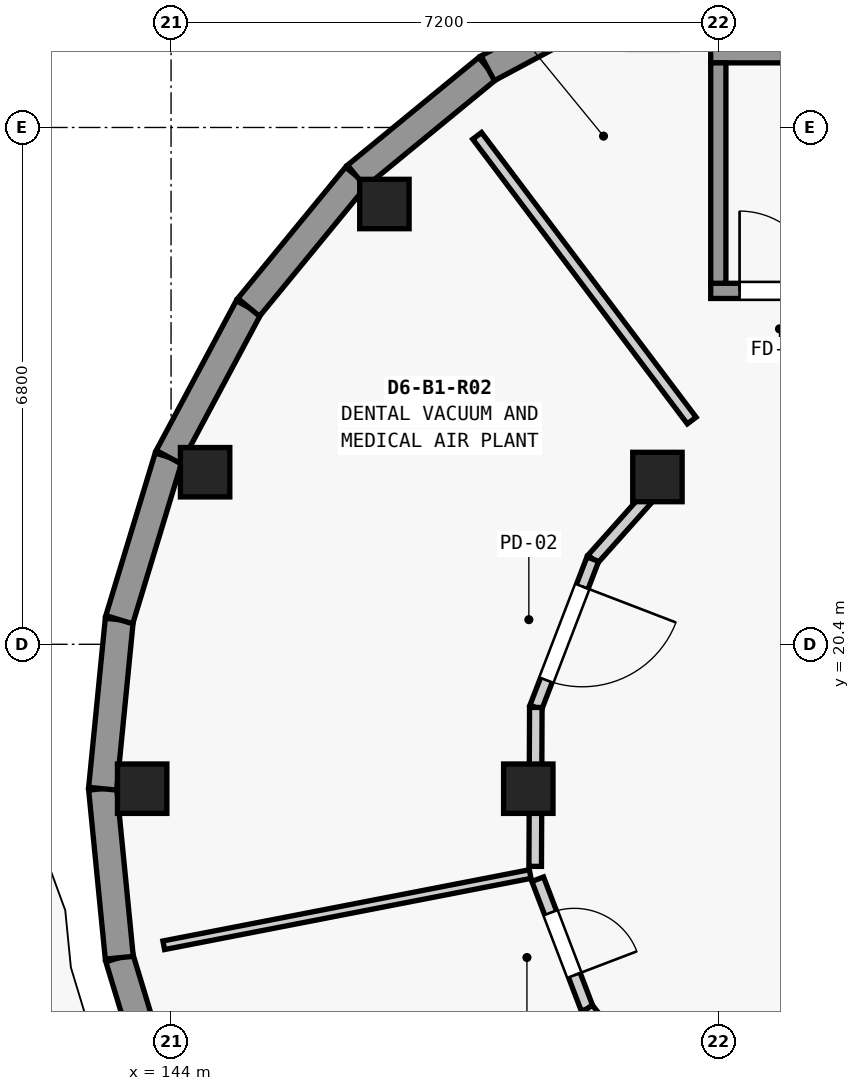
"""IFC4 building model, lengths in metres.
Left out: names, types, materials, properties, quantities, classifications, styles, units other than length and angle.
Written with IfcOpenShell. Run it as: python <this file> out.ifc"""

import sys

from ifc_helpers import new_model, si_unit, direction, frame, frame_2d, origin, origin_2d, place, context, subcontext, project, spatial, rectangle, extrude, element, fill, save


model = new_model("IFC4")
c1 = context("Model", 3, precision=1e-05, world=origin(), true_north=direction((0.0, 1.0)))
c2 = subcontext(c1, "Body", "Model", "MODEL_VIEW")
j1 = project(units=[si_unit("LENGTHUNIT", "METRE"), si_unit("PLANEANGLEUNIT", "RADIAN")], contexts=[c1])
p1 = place(None, origin())
s1 = spatial("IfcSite", under=j1, at=p1, CompositionType="ELEMENT")
p2 = place(p1, origin())
s2 = spatial("IfcBuilding", under=s1, at=p2, CompositionType="ELEMENT")
p3 = place(p2, frame((0.0, 0.0, -4.55)))
s3 = spatial("IfcBuildingStorey", under=s2, at=p3, CompositionType="ELEMENT", Elevation=-4.55)
for number, where, z_axis, x_axis in (
    (1, (146.807, 26.193, 0.0), (0.0, 0.0, 1.0), (1.0, 0.0, 0.0)),
    (2, (144.448, 22.664, 0.0), (0.0, 0.0, 1.0), (1.0, 0.0, 0.0)),
    (3, (143.62, 18.5, 0.0), (0.0, 0.0, 1.0), (1.0, 0.0, 0.0)),
    (4, (150.399, 22.601, 0.0), (0.0, 0.0, 1.0), (1.0, 0.0, 0.0)),
    (5, (148.7, 18.5, 0.0), (0.0, 0.0, 1.0), (1.0, 0.0, 0.0)),
):
    element("IfcColumn", number, at=place(p3, frame(where, z_axis=z_axis, x_axis=x_axis)), inside=s3, PredefinedType="COLUMN", context=c2, shape_type="SweptSolid", body=[
        extrude(rectangle(XDim=0.65, YDim=0.65, at=origin_2d()), origin(), (0.0, 0.0, 1.0), 4.55),
    ])
p4 = place(p3, frame((143.968, 14.137, 0.0), z_axis=(0.0, 0.0, 1.0), x_axis=(-0.290322655883, 0.956928814218, 0.0)))
e6 = element("IfcWall", 6, at=p4, inside=s3, PredefinedType="USERDEFINED", context=c2, shape_type="SweptSolid", body=[
    extrude(rectangle(XDim=2.235, YDim=0.37, at=frame_2d((1.118, 0.0))), origin(), (0.0, 0.0, 1.0), 3.348),
])
for number, where, z_axis, x_axis in (
    (7, (143.319, 16.276, 0.0), (0.0, 0.0, 1.0), (-0.098, 0.995, 0.0)),
    (8, (143.1, 18.5, 0.0), (0.0, 0.0, 1.0), (0.098, 0.995, 0.0)),
):
    element("IfcWall", number, at=place(p3, frame(where, z_axis=z_axis, x_axis=x_axis)), inside=s3, PredefinedType="USERDEFINED", context=c2, shape_type="SweptSolid", body=[
        extrude(rectangle(XDim=2.235, YDim=0.37, at=frame_2d((1.117, 0.0))), origin(), (0.0, 0.0, 1.0), 3.348),
    ])
p5 = place(p3, frame((143.319, 20.724, 0.0), z_axis=(0.0, 0.0, 1.0), x_axis=(0.290322655883, 0.956928814218, 0.0)))
e9 = element("IfcWall", 9, at=p5, inside=s3, PredefinedType="USERDEFINED", context=c2, shape_type="SweptSolid", body=[
    extrude(rectangle(XDim=2.235, YDim=0.37, at=frame_2d((1.118, 0.0))), origin(), (0.0, 0.0, 1.0), 3.348),
])
for number, where, z_axis, x_axis in (
    (10, (143.968, 22.863, 0.0), (0.0, 0.0, 1.0), (0.471, 0.882, 0.0)),
    (11, (145.021, 24.834, 0.0), (0.0, 0.0, 1.0), (0.635, 0.773, 0.0)),
    (12, (146.439, 26.561, 0.0), (0.0, 0.0, 1.0), (0.773, 0.635, 0.0)),
    (13, (148.166, 27.979, 0.0), (0.0, 0.0, 1.0), (0.882, 0.471, 0.0)),
):
    element("IfcWall", number, at=place(p3, frame(where, z_axis=z_axis, x_axis=x_axis)), inside=s3, PredefinedType="USERDEFINED", context=c2, shape_type="SweptSolid", body=[
        extrude(rectangle(XDim=2.235, YDim=0.37, at=frame_2d((1.117, 0.0))), origin(), (0.0, 0.0, 1.0), 3.348),
    ])
p6 = place(p3, frame((151.1, 25.05, 0.0), z_axis=(0.0, 0.0, 1.0), x_axis=(1.0, 0.0, 0.0)))
e14 = element("IfcWall", 14, at=p6, inside=s3, PredefinedType="SHEAR", context=c2, shape_type="SweptSolid", body=[
    extrude(rectangle(XDim=6.8, YDim=0.2, at=frame_2d((3.4, 0.0))), origin(), (0.0, 0.0, 1.0), 4.148),
])
p7 = place(p6, frame((0.38, 0.0, 0.0)))
e15 = element("IfcOpeningElement", 15, at=p7, cuts=e14, PredefinedType="OPENING", context=c2, shape_type="SweptSolid", body=[
    extrude(rectangle(XDim=1.05, YDim=2.15, at=frame_2d((0.525, 1.075))), frame((0.0, 0.11, 0.0), z_axis=(0.0, -1.0, 0.0), x_axis=(1.0, 0.0, 0.0)), (0.0, 0.0, 1.0), 0.22),
])
p8 = place(p3, frame((151.1, 28.15, 0.0), z_axis=(0.0, 0.0, 1.0), x_axis=(1.0, 0.0, 0.0)))
e16 = element("IfcWall", 16, at=p8, inside=s3, PredefinedType="SHEAR", context=c2, shape_type="SweptSolid", body=[
    extrude(rectangle(XDim=6.8, YDim=0.2, at=frame_2d((3.4, 0.0))), origin(), (0.0, 0.0, 1.0), 4.148),
])
p9 = place(p3, frame((151.2, 25.15, 0.0), z_axis=(0.0, 0.0, 1.0), x_axis=(0.0, 1.0, 0.0)))
e17 = element("IfcWall", 17, at=p9, inside=s3, PredefinedType="SHEAR", context=c2, shape_type="SweptSolid", body=[
    extrude(rectangle(XDim=2.9, YDim=0.2, at=frame_2d((1.45, 0.0))), origin(), (0.0, 0.0, 1.0), 4.148),
])
p10 = place(p3, frame((150.85, 23.344, 0.0), z_axis=(0.0, 0.0, 1.0), x_axis=(-0.601830514666, 0.798623836118, 0.0)))
e18 = element("IfcWall", 18, at=p10, inside=s3, PredefinedType="PARTITIONING", context=c2, shape_type="SweptSolid", body=[
    extrude(rectangle(XDim=4.691, YDim=0.145, at=frame_2d((2.345, 0.0))), origin(), (0.0, 0.0, 1.0), 3.323),
])
p11 = place(p3, frame((148.725, 17.377, 0.0), z_axis=(0.0, 0.0, 1.0), x_axis=(-0.981631167978, -0.190788495604, 0.0)))
e19 = element("IfcWall", 19, at=p11, inside=s3, PredefinedType="PARTITIONING", context=c2, shape_type="SweptSolid", body=[
    extrude(rectangle(XDim=4.911, YDim=0.115, at=frame_2d((2.456, 0.0))), origin(), (0.0, 0.0, 1.0), 3.323),
])
p12 = place(p3, frame((150.251, 22.307, 0.0), z_axis=(0.0, 0.0, 1.0), x_axis=(-0.665670610056, -0.746245696073, 0.0)))
e20 = element("IfcWall", 20, at=p12, inside=s3, PredefinedType="PARTITIONING", context=c2, shape_type="SweptSolid", body=[
    extrude(rectangle(XDim=1.054, YDim=0.165, at=frame_2d((0.527, 0.0))), origin(), (0.0, 0.0, 1.0), 3.323),
])
p13 = place(p3, frame((149.549, 21.52, 0.0), z_axis=(0.0, 0.0, 1.0), x_axis=(-0.358830356871, -0.93340279354, 0.0)))
e21 = element("IfcWall", 21, at=p13, inside=s3, PredefinedType="PARTITIONING", context=c2, shape_type="SweptSolid", body=[
    extrude(rectangle(XDim=2.09, YDim=0.165, at=frame_2d((1.045, 0.0))), origin(), (0.0, 0.0, 1.0), 3.323),
])
p14 = place(p13, frame((0.385, 0.0, 0.0)))
e22 = element("IfcOpeningElement", 22, at=p14, cuts=e21, PredefinedType="OPENING", context=c2, shape_type="SweptSolid", body=[
    extrude(rectangle(XDim=1.32, YDim=2.24, at=frame_2d((0.66, 1.12))), frame((0.0, 0.093, 0.0), z_axis=(0.0, -1.0, 0.0), x_axis=(1.0, 0.0, 0.0)), (0.0, 0.0, 1.0), 0.185),
])
p15 = place(p3, frame((148.799, 19.569, 0.0), z_axis=(0.0, 0.0, 1.0), x_axis=(-0.004213900998, -0.99999112148, 0.0)))
e23 = element("IfcWall", 23, at=p15, inside=s3, PredefinedType="PARTITIONING", context=c2, shape_type="SweptSolid", body=[
    extrude(rectangle(XDim=0.753, YDim=0.165, at=frame_2d((0.376, 0.0))), origin(), (0.0, 0.0, 1.0), 3.323),
])
p16 = place(p3, frame((148.794, 18.184, 0.0), z_axis=(0.0, 0.0, 1.0), x_axis=(-0.004149341873, -0.999991391444, 0.0)))
e24 = element("IfcWall", 24, at=p16, inside=s3, PredefinedType="PARTITIONING", context=c2, shape_type="SweptSolid", body=[
    extrude(rectangle(XDim=0.706, YDim=0.165, at=frame_2d((0.353, 0.0))), origin(), (0.0, 0.0, 1.0), 3.323),
])
p17 = place(p3, frame((148.824, 17.309, 0.0), z_axis=(0.0, 0.0, 1.0), x_axis=(0.356746140056, -0.934201365636, 0.0)))
e25 = element("IfcWall", 25, at=p17, inside=s3, PredefinedType="PARTITIONING", context=c2, shape_type="SweptSolid", body=[
    extrude(rectangle(XDim=1.825, YDim=0.165, at=frame_2d((0.913, 0.0))), origin(), (0.0, 0.0, 1.0), 3.323),
])
p18 = place(p17, frame((0.472, 0.0, 0.0)))
e26 = element("IfcOpeningElement", 26, at=p18, cuts=e25, PredefinedType="OPENING", context=c2, shape_type="SweptSolid", body=[
    extrude(rectangle(XDim=0.88, YDim=2.1, at=frame_2d((0.44, 1.05))), frame((0.0, 0.093, 0.0), z_axis=(0.0, -1.0, 0.0), x_axis=(1.0, 0.0, 0.0)), (0.0, 0.0, 1.0), 0.185),
])
p19 = place(p3, frame((149.475, 15.604, 0.0), z_axis=(0.0, 0.0, 1.0), x_axis=(0.62928673226, -0.777173216601, 0.0)))
e27 = element("IfcWall", 27, at=p19, inside=s3, PredefinedType="PARTITIONING", context=c2, shape_type="SweptSolid", body=[
    extrude(rectangle(XDim=1.19, YDim=0.165, at=frame_2d((0.595, 0.0))), origin(), (0.0, 0.0, 1.0), 3.323),
])
p20 = place(p7, origin())
e28 = element("IfcDoor", 28, at=p20, inside=s3, OperationType="SINGLE_SWING_LEFT", PredefinedType="DOOR", context=c2, shape_type="SweptSolid", body=[
    extrude(rectangle(XDim=1.05, YDim=2.15, at=frame_2d((0.525, 1.075))), frame((0.0, 0.025, 0.0), z_axis=(0.0, -1.0, 0.0), x_axis=(1.0, 0.0, 0.0)), (0.0, 0.0, 1.0), 0.05),
])
fill(e15, e28)
p21 = place(p14, origin())
e29 = element("IfcDoor", 29, at=p21, inside=s3, OperationType="SINGLE_SWING_LEFT", PredefinedType="DOOR", context=c2, shape_type="SweptSolid", body=[
    extrude(rectangle(XDim=1.32, YDim=2.24, at=frame_2d((0.66, 1.12))), frame((0.0, 0.025, 0.0), z_axis=(0.0, -1.0, 0.0), x_axis=(1.0, 0.0, 0.0)), (0.0, 0.0, 1.0), 0.05),
])
fill(e22, e29)
p22 = place(p18, origin())
e30 = element("IfcDoor", 30, at=p22, inside=s3, OperationType="SINGLE_SWING_RIGHT", PredefinedType="DOOR", context=c2, shape_type="SweptSolid", body=[
    extrude(rectangle(XDim=0.88, YDim=2.1, at=frame_2d((0.44, 1.05))), frame((0.0, 0.025, 0.0), z_axis=(0.0, -1.0, 0.0), x_axis=(1.0, 0.0, 0.0)), (0.0, 0.0, 1.0), 0.05),
])
fill(e26, e30)
save(model, sys.argv[1])
